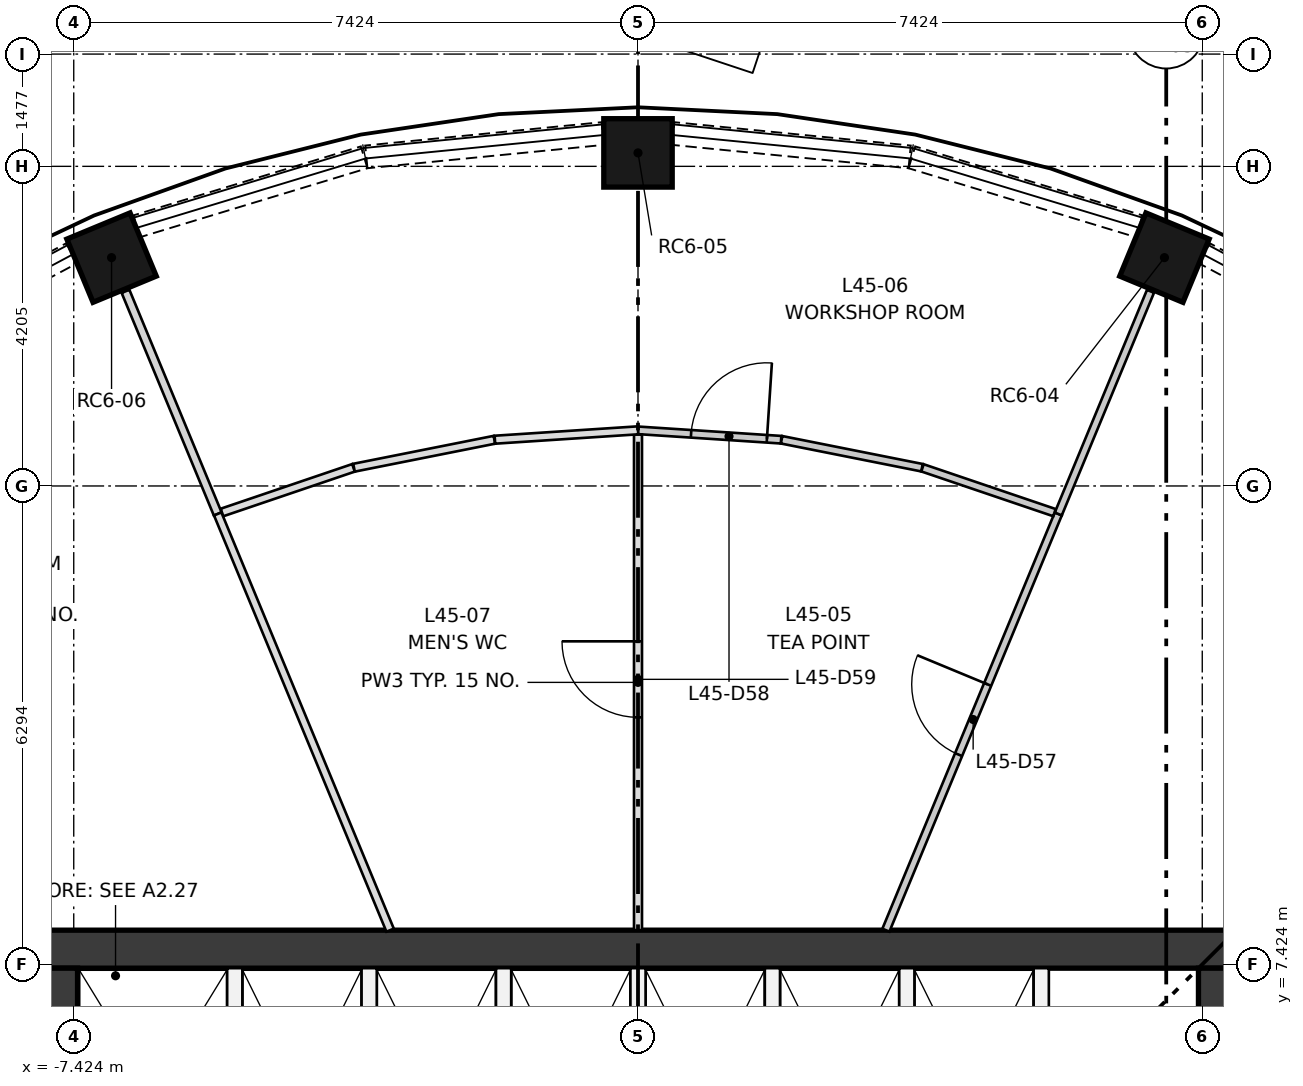
"""IFC4 building model, lengths in metres.
Left out: names, types, materials, properties, quantities, classifications, styles, units other than length and angle.
Written with IfcOpenShell. Run it as: python <this file> out.ifc"""

import sys

from ifc_helpers import new_model, si_unit, direction, frame, frame_2d, origin, origin_2d, place, context, subcontext, project, spatial, rectangle, extrude, element, fill, save


model = new_model("IFC4")
c1 = context("Model", 3, precision=1e-05, world=origin(), true_north=direction((0.0, 1.0)))
c2 = subcontext(c1, "Body", "Model", "MODEL_VIEW")
j1 = project(units=[si_unit("LENGTHUNIT", "METRE"), si_unit("PLANEANGLEUNIT", "RADIAN")], contexts=[c1])
p1 = place(None, origin())
s1 = spatial("IfcSite", under=j1, at=p1, CompositionType="ELEMENT")
p2 = place(p1, origin())
s2 = spatial("IfcBuilding", under=s1, at=p2, CompositionType="ELEMENT")
p3 = place(p2, frame((0.0, 0.0, 170.9)))
s3 = spatial("IfcBuildingStorey", under=s2, at=p3, CompositionType="ELEMENT", Elevation=170.9)
for number, where, z_axis, x_axis in (
    (1, (6.927, 16.722, 0.0), (0.0, 0.0, 1.0), (0.383, 0.924, 0.0)),
    (2, (0.0, 18.1, 0.0), (0.0, 0.0, 1.0), (0.0, 1.0, 0.0)),
    (3, (-6.927, 16.722, 0.0), (0.0, 0.0, 1.0), (-0.383, 0.924, 0.0)),
):
    element("IfcColumn", number, at=place(p3, frame(where, z_axis=z_axis, x_axis=x_axis)), inside=s3, PredefinedType="COLUMN", context=c2, shape_type="SweptSolid", body=[
        extrude(rectangle(XDim=0.9, YDim=0.9, at=origin_2d()), origin(), (0.0, 0.0, 1.0), 3.35),
    ])
p4 = place(p3, frame((-7.874, 7.624, 0.0), z_axis=(0.0, 0.0, 1.0), x_axis=(1.0, 0.0, 0.0)))
e4 = element("IfcWall", 4, at=p4, inside=s3, PredefinedType="SHEAR", context=c2, shape_type="SweptSolid", body=[
    extrude(rectangle(XDim=15.748, YDim=0.5, at=frame_2d((7.874, 0.0))), origin(), (0.0, 0.0, 1.0), 3.35),
])
p5 = place(p3, frame((-7.624, -7.374, 0.0), z_axis=(0.0, 0.0, 1.0), x_axis=(0.0, 1.0, 0.0)))
e5 = element("IfcWall", 5, at=p5, inside=s3, PredefinedType="SHEAR", context=c2, shape_type="SweptSolid", body=[
    extrude(rectangle(XDim=14.748, YDim=0.5, at=frame_2d((7.374, 0.0))), origin(), (0.0, 0.0, 1.0), 3.35),
])
p6 = place(p5, frame((6.874, 0.0, 0.0)))
e6 = element("IfcOpeningElement", 6, at=p6, cuts=e5, PredefinedType="OPENING", context=c2, shape_type="SweptSolid", body=[
    extrude(rectangle(XDim=1.0, YDim=2.1, at=frame_2d((0.5, 1.05))), frame((0.0, 0.26, 0.0), z_axis=(0.0, -1.0, 0.0), x_axis=(1.0, 0.0, 0.0)), (0.0, 0.0, 1.0), 0.52),
])
p7 = place(p5, frame((3.75, 0.0, 0.0)))
e7 = element("IfcOpeningElement", 7, at=p7, cuts=e5, PredefinedType="OPENING", context=c2, shape_type="SweptSolid", body=[
    extrude(rectangle(XDim=1.8, YDim=2.1, at=frame_2d((0.9, 1.05))), frame((0.0, 0.26, 0.0), z_axis=(0.0, -1.0, 0.0), x_axis=(1.0, 0.0, 0.0)), (0.0, 0.0, 1.0), 0.52),
])
p8 = place(p5, frame((9.198, 0.0, 0.0)))
e8 = element("IfcOpeningElement", 8, at=p8, cuts=e5, PredefinedType="OPENING", context=c2, shape_type="SweptSolid", body=[
    extrude(rectangle(XDim=1.8, YDim=2.1, at=frame_2d((0.9, 1.05))), frame((0.0, 0.26, 0.0), z_axis=(0.0, -1.0, 0.0), x_axis=(1.0, 0.0, 0.0)), (0.0, 0.0, 1.0), 0.52),
])
p9 = place(p3, frame((7.624, -7.374, 0.0), z_axis=(0.0, 0.0, 1.0), x_axis=(0.0, 1.0, 0.0)))
e9 = element("IfcWall", 9, at=p9, inside=s3, PredefinedType="SHEAR", context=c2, shape_type="SweptSolid", body=[
    extrude(rectangle(XDim=14.748, YDim=0.5, at=frame_2d((7.374, 0.0))), origin(), (0.0, 0.0, 1.0), 3.35),
])
p10 = place(p9, frame((6.874, 0.0, 0.0)))
e10 = element("IfcOpeningElement", 10, at=p10, cuts=e9, PredefinedType="OPENING", context=c2, shape_type="SweptSolid", body=[
    extrude(rectangle(XDim=1.0, YDim=2.1, at=frame_2d((0.5, 1.05))), frame((0.0, 0.26, 0.0), z_axis=(0.0, -1.0, 0.0), x_axis=(1.0, 0.0, 0.0)), (0.0, 0.0, 1.0), 0.52),
])
p11 = place(p9, frame((3.75, 0.0, 0.0)))
e11 = element("IfcOpeningElement", 11, at=p11, cuts=e9, PredefinedType="OPENING", context=c2, shape_type="SweptSolid", body=[
    extrude(rectangle(XDim=1.8, YDim=2.1, at=frame_2d((0.9, 1.05))), frame((0.0, 0.26, 0.0), z_axis=(0.0, -1.0, 0.0), x_axis=(1.0, 0.0, 0.0)), (0.0, 0.0, 1.0), 0.52),
])
p12 = place(p9, frame((9.198, 0.0, 0.0)))
e12 = element("IfcOpeningElement", 12, at=p12, cuts=e9, PredefinedType="OPENING", context=c2, shape_type="SweptSolid", body=[
    extrude(rectangle(XDim=1.8, YDim=2.1, at=frame_2d((0.9, 1.05))), frame((0.0, 0.26, 0.0), z_axis=(0.0, -1.0, 0.0), x_axis=(1.0, 0.0, 0.0)), (0.0, 0.0, 1.0), 0.52),
])
for number, where, z_axis, x_axis in (
    (13, (-5.305, 4.174, 0.0), (0.0, 0.0, 1.0), (0.0, 1.0, 0.0)),
    (14, (-3.537, 4.174, 0.0), (0.0, 0.0, 1.0), (0.0, 1.0, 0.0)),
    (15, (-1.769, 4.174, 0.0), (0.0, 0.0, 1.0), (0.0, 1.0, 0.0)),
    (16, (0.0, 4.174, 0.0), (0.0, 0.0, 1.0), (0.0, 1.0, 0.0)),
    (17, (1.769, 4.174, 0.0), (0.0, 0.0, 1.0), (0.0, 1.0, 0.0)),
    (18, (3.537, 4.174, 0.0), (0.0, 0.0, 1.0), (0.0, 1.0, 0.0)),
    (19, (5.305, 4.174, 0.0), (0.0, 0.0, 1.0), (0.0, 1.0, 0.0)),
):
    element("IfcWall", number, at=place(p3, frame(where, z_axis=z_axis, x_axis=x_axis)), inside=s3, PredefinedType="PARTITIONING", context=c2, shape_type="SweptSolid", body=[
        extrude(rectangle(XDim=3.2, YDim=0.2, at=frame_2d((1.6, 0.0))), origin(), (0.0, 0.0, 1.0), 3.0),
    ])
p13 = place(p3, frame((10.209, 15.306, 0.0), z_axis=(0.0, 0.0, 1.0), x_axis=(-0.882024038027, 0.47120441036, 0.0)))
e20 = element("IfcWall", 20, at=p13, inside=s3, PredefinedType="SOLIDWALL", context=c2, shape_type="SweptSolid", body=[
    extrude(rectangle(XDim=3.125, YDim=0.3, at=frame_2d((1.562, 0.0))), origin(), (0.0, 0.0, 1.0), 0.9),
])
p14 = place(p3, frame((6.596, 17.135, 0.0), z_axis=(0.0, 0.0, 1.0), x_axis=(-0.957001416136, 0.290083245834, 0.0)))
e21 = element("IfcWall", 21, at=p14, inside=s3, PredefinedType="SOLIDWALL", context=c2, shape_type="SweptSolid", body=[
    extrude(rectangle(XDim=3.127, YDim=0.3, at=frame_2d((1.563, 0.0))), origin(), (0.0, 0.0, 1.0), 0.9),
])
for number, where, z_axis, x_axis in (
    (22, (3.574, 18.048, 0.0), (0.0, 0.0, 1.0), (-0.995, 0.098, 0.0)),
    (23, (-0.464, 18.354, 0.0), (0.0, 0.0, 1.0), (-0.995, -0.098, 0.0)),
):
    element("IfcWall", number, at=place(p3, frame(where, z_axis=z_axis, x_axis=x_axis)), inside=s3, PredefinedType="SOLIDWALL", context=c2, shape_type="SweptSolid", body=[
        extrude(rectangle(XDim=3.125, YDim=0.3, at=frame_2d((1.563, 0.0))), origin(), (0.0, 0.0, 1.0), 0.9),
    ])
p15 = place(p3, frame((-3.604, 18.042, 0.0), z_axis=(0.0, 0.0, 1.0), x_axis=(-0.957001416136, -0.290083245834, 0.0)))
e24 = element("IfcWall", 24, at=p15, inside=s3, PredefinedType="SOLIDWALL", context=c2, shape_type="SweptSolid", body=[
    extrude(rectangle(XDim=3.127, YDim=0.3, at=frame_2d((1.563, 0.0))), origin(), (0.0, 0.0, 1.0), 0.9),
])
p16 = place(p3, frame((-7.452, 16.779, 0.0), z_axis=(0.0, 0.0, 1.0), x_axis=(-0.882024038027, -0.47120441036, 0.0)))
e25 = element("IfcWall", 25, at=p16, inside=s3, PredefinedType="SOLIDWALL", context=c2, shape_type="SweptSolid", body=[
    extrude(rectangle(XDim=3.125, YDim=0.3, at=frame_2d((1.562, 0.0))), origin(), (0.0, 0.0, 1.0), 0.9),
])
p17 = place(p3, frame((3.261, 7.874, 0.0), z_axis=(0.0, 0.0, 1.0), x_axis=(0.382690105068, 0.923876768559, 0.0)))
e26 = element("IfcWall", 26, at=p17, inside=s3, PredefinedType="PARTITIONING", context=c2, shape_type="SweptSolid", body=[
    extrude(rectangle(XDim=5.927, YDim=0.1, at=frame_2d((2.964, 0.0))), origin(), (0.0, 0.0, 1.0), 3.0),
])
p18 = place(p17, frame((2.5, 0.0, 0.0)))
e27 = element("IfcOpeningElement", 27, at=p18, cuts=e26, PredefinedType="OPENING", context=c2, shape_type="SweptSolid", body=[
    extrude(rectangle(XDim=1.0, YDim=2.1, at=frame_2d((0.5, 1.05))), frame((0.0, 0.06, 0.0), z_axis=(0.0, -1.0, 0.0), x_axis=(1.0, 0.0, 0.0)), (0.0, 0.0, 1.0), 0.12),
])
p19 = place(p3, frame((5.53, 13.35, 0.0), z_axis=(0.0, 0.0, 1.0), x_axis=(0.382689618566, 0.923876970079, 0.0)))
e28 = element("IfcWall", 28, at=p19, inside=s3, PredefinedType="PARTITIONING", context=c2, shape_type="SweptSolid", body=[
    extrude(rectangle(XDim=3.17, YDim=0.1, at=frame_2d((1.585, 0.0))), origin(), (0.0, 0.0, 1.0), 3.0),
])
p20 = place(p3, frame((0.0, 14.45, 0.0), z_axis=(0.0, 0.0, 1.0), x_axis=(0.997862900294, -0.065342422802, 0.0)))
e29 = element("IfcWall", 29, at=p20, inside=s3, PredefinedType="PARTITIONING", context=c2, shape_type="SweptSolid", body=[
    extrude(rectangle(XDim=1.887, YDim=0.1, at=frame_2d((0.943, 0.0))), origin(), (0.0, 0.0, 1.0), 3.0),
])
p21 = place(p20, frame((0.7, 0.0, 0.0)))
e30 = element("IfcOpeningElement", 30, at=p21, cuts=e29, PredefinedType="OPENING", context=c2, shape_type="SweptSolid", body=[
    extrude(rectangle(XDim=1.0, YDim=2.1, at=frame_2d((0.5, 1.05))), frame((0.0, 0.06, 0.0), z_axis=(0.0, -1.0, 0.0), x_axis=(1.0, 0.0, 0.0)), (0.0, 0.0, 1.0), 0.12),
])
p22 = place(p3, frame((1.889, 14.326, 0.0), z_axis=(0.0, 0.0, 1.0), x_axis=(0.980789493394, -0.195069140684, 0.0)))
e31 = element("IfcWall", 31, at=p22, inside=s3, PredefinedType="PARTITIONING", context=c2, shape_type="SweptSolid", body=[
    extrude(rectangle(XDim=1.884, YDim=0.1, at=frame_2d((0.942, 0.0))), origin(), (0.0, 0.0, 1.0), 3.0),
])
p23 = place(p3, frame((3.743, 13.957, 0.0), z_axis=(0.0, 0.0, 1.0), x_axis=(0.946938181516, -0.321415743839, 0.0)))
e32 = element("IfcWall", 32, at=p23, inside=s3, PredefinedType="PARTITIONING", context=c2, shape_type="SweptSolid", body=[
    extrude(rectangle(XDim=1.834, YDim=0.1, at=frame_2d((0.917, 0.0))), origin(), (0.0, 0.0, 1.0), 3.0),
])
p24 = place(p3, frame((0.0, 7.874, 0.0), z_axis=(0.0, 0.0, 1.0), x_axis=(0.0, 1.0, 0.0)))
e33 = element("IfcWall", 33, at=p24, inside=s3, PredefinedType="PARTITIONING", context=c2, shape_type="SweptSolid", body=[
    extrude(rectangle(XDim=6.52, YDim=0.105, at=frame_2d((3.26, 0.0))), origin(), (0.0, 0.0, 1.0), 3.0),
])
p25 = place(p24, frame((2.8, 0.0, 0.0)))
e34 = element("IfcOpeningElement", 34, at=p25, cuts=e33, PredefinedType="OPENING", context=c2, shape_type="SweptSolid", body=[
    extrude(rectangle(XDim=1.0, YDim=2.1, at=frame_2d((0.5, 1.05))), frame((0.0, 0.062, 0.0), z_axis=(0.0, -1.0, 0.0), x_axis=(1.0, 0.0, 0.0)), (0.0, 0.0, 1.0), 0.125),
])
p26 = place(p3, frame((-3.743, 13.957, 0.0), z_axis=(0.0, 0.0, 1.0), x_axis=(-0.946932980831, -0.321431065415, 0.0)))
e35 = element("IfcWall", 35, at=p26, inside=s3, PredefinedType="PARTITIONING", context=c2, shape_type="SweptSolid", body=[
    extrude(rectangle(XDim=1.828, YDim=0.105, at=frame_2d((0.914, 0.0))), origin(), (0.0, 0.0, 1.0), 3.0),
])
p27 = place(p3, frame((-1.889, 14.326, 0.0), z_axis=(0.0, 0.0, 1.0), x_axis=(-0.980784560384, -0.195093941763, 0.0)))
e36 = element("IfcWall", 36, at=p27, inside=s3, PredefinedType="PARTITIONING", context=c2, shape_type="SweptSolid", body=[
    extrude(rectangle(XDim=1.883, YDim=0.105, at=frame_2d((0.942, 0.0))), origin(), (0.0, 0.0, 1.0), 3.0),
])
p28 = place(p3, frame((0.0, 14.45, 0.0), z_axis=(0.0, 0.0, 1.0), x_axis=(-0.997862900294, -0.065342422802, 0.0)))
e37 = element("IfcWall", 37, at=p28, inside=s3, PredefinedType="PARTITIONING", context=c2, shape_type="SweptSolid", body=[
    extrude(rectangle(XDim=1.887, YDim=0.105, at=frame_2d((0.943, 0.0))), origin(), (0.0, 0.0, 1.0), 3.0),
])
p29 = place(p3, frame((-5.53, 13.35, 0.0), z_axis=(0.0, 0.0, 1.0), x_axis=(-0.382689618566, 0.923876970079, 0.0)))
e38 = element("IfcWall", 38, at=p29, inside=s3, PredefinedType="PARTITIONING", context=c2, shape_type="SweptSolid", body=[
    extrude(rectangle(XDim=3.17, YDim=0.11, at=frame_2d((1.585, 0.0))), origin(), (0.0, 0.0, 1.0), 3.0),
])
p30 = place(p3, frame((-3.261, 7.874, 0.0), z_axis=(0.0, 0.0, 1.0), x_axis=(-0.382690105068, 0.923876768559, 0.0)))
e39 = element("IfcWall", 39, at=p30, inside=s3, PredefinedType="PARTITIONING", context=c2, shape_type="SweptSolid", body=[
    extrude(rectangle(XDim=5.927, YDim=0.105, at=frame_2d((2.964, 0.0))), origin(), (0.0, 0.0, 1.0), 3.0),
])
p31 = place(p18, origin())
e40 = element("IfcDoor", 40, at=p31, inside=s3, OperationType="SINGLE_SWING_RIGHT", PredefinedType="DOOR", context=c2, shape_type="SweptSolid", body=[
    extrude(rectangle(XDim=1.0, YDim=2.1, at=frame_2d((0.5, 1.05))), frame((0.0, 0.025, 0.0), z_axis=(0.0, -1.0, 0.0), x_axis=(1.0, 0.0, 0.0)), (0.0, 0.0, 1.0), 0.05),
])
fill(e27, e40)
p32 = place(p21, origin())
e41 = element("IfcDoor", 41, at=p32, inside=s3, OperationType="SINGLE_SWING_RIGHT", PredefinedType="DOOR", context=c2, shape_type="SweptSolid", body=[
    extrude(rectangle(XDim=1.0, YDim=2.1, at=frame_2d((0.5, 1.05))), frame((0.0, 0.025, 0.0), z_axis=(0.0, -1.0, 0.0), x_axis=(1.0, 0.0, 0.0)), (0.0, 0.0, 1.0), 0.05),
])
fill(e30, e41)
p33 = place(p25, origin())
e42 = element("IfcDoor", 42, at=p33, inside=s3, OperationType="SINGLE_SWING_RIGHT", PredefinedType="DOOR", context=c2, shape_type="SweptSolid", body=[
    extrude(rectangle(XDim=1.0, YDim=2.1, at=frame_2d((0.5, 1.05))), frame((0.0, 0.025, 0.0), z_axis=(0.0, -1.0, 0.0), x_axis=(1.0, 0.0, 0.0)), (0.0, 0.0, 1.0), 0.05),
])
fill(e34, e42)
save(model, sys.argv[1])
